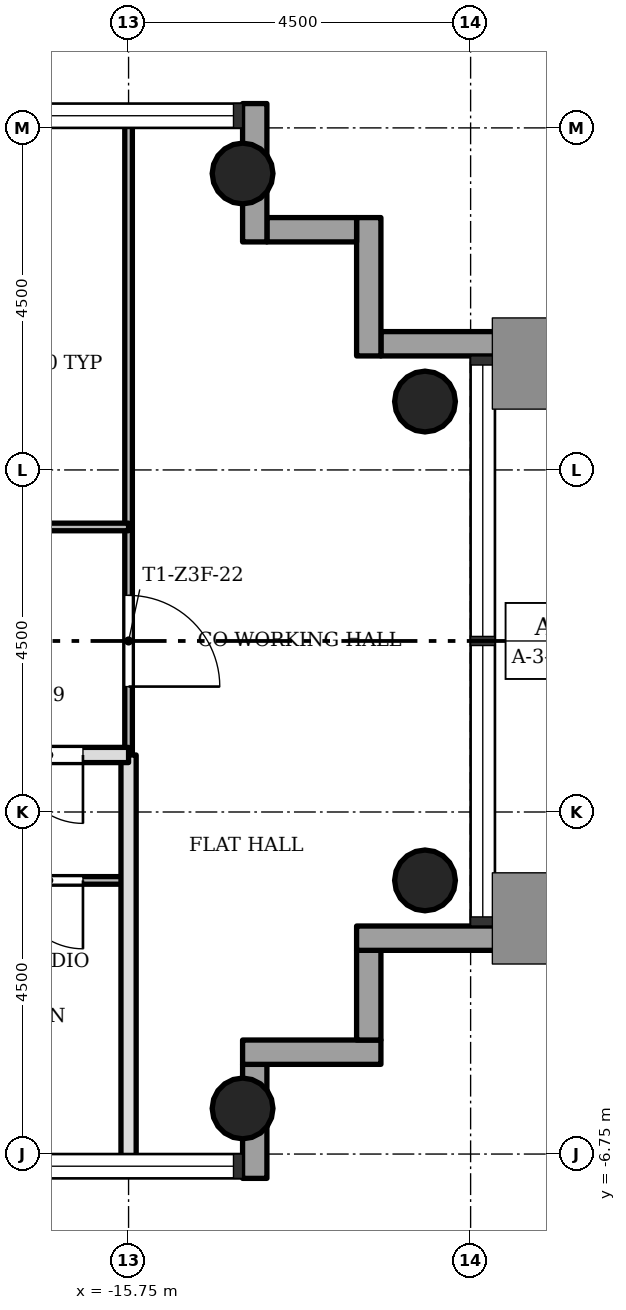
"""IFC4 building model, lengths in metres.
Left out: names, types, materials, properties, quantities, classifications, styles, units other than length and angle.
Written with IfcOpenShell. Run it as: python <this file> out.ifc"""

import sys

from ifc_helpers import new_model, si_unit, direction, frame, frame_2d, origin, origin_2d, place, context, subcontext, project, spatial, rectangle, hollow_circle, extrude, element, fill, save


model = new_model("IFC4")
c1 = context("Model", 3, precision=1e-05, world=origin(), true_north=direction((0.0, 1.0)))
c2 = subcontext(c1, "Body", "Model", "MODEL_VIEW")
j1 = project(units=[si_unit("LENGTHUNIT", "METRE"), si_unit("PLANEANGLEUNIT", "RADIAN")], contexts=[c1])
p1 = place(None, origin())
s1 = spatial("IfcSite", under=j1, at=p1, CompositionType="ELEMENT")
p2 = place(p1, origin())
s2 = spatial("IfcBuilding", under=s1, at=p2, CompositionType="ELEMENT")
p3 = place(p2, frame((0.0, 0.0, 171.1)))
s3 = spatial("IfcBuildingStorey", under=s2, at=p3, CompositionType="ELEMENT", Elevation=171.1)
for number, where, z_axis, x_axis in (
    (1, (-14.25, -6.15, 0.0), (0.0, 0.0, 1.0), (1.0, 0.0, 0.0)),
    (2, (-14.25, 6.15, 0.0), (0.0, 0.0, 1.0), (1.0, 0.0, 0.0)),
    (3, (-11.85, -3.15, 0.0), (0.0, 0.0, 1.0), (1.0, 0.0, 0.0)),
    (4, (-11.85, 3.15, 0.0), (0.0, 0.0, 1.0), (1.0, 0.0, 0.0)),
):
    element("IfcColumn", number, at=place(p3, frame(where, z_axis=z_axis, x_axis=x_axis)), inside=s3, PredefinedType="COLUMN", context=c2, shape_type="SweptSolid", body=[
        extrude(hollow_circle(Radius=0.4, WallThickness=0.028, at=origin_2d()), origin(), (0.0, 0.0, 1.0), 3.4),
    ])
p4 = place(p3, frame((-14.09, -7.07, -0.3), z_axis=(0.0, 0.0, 1.0), x_axis=(0.0, 1.0, 0.0)))
e5 = element("IfcWall", 5, at=p4, inside=s3, PredefinedType="STANDARD", context=c2, shape_type="SweptSolid", body=[
    extrude(rectangle(XDim=1.5, YDim=0.32, at=frame_2d((0.75, 0.0))), origin(), (0.0, 0.0, 1.0), 3.4),
])
p5 = place(p3, frame((-14.25, -5.41, -0.3), z_axis=(0.0, 0.0, 1.0), x_axis=(1.0, 0.0, 0.0)))
e6 = element("IfcWall", 6, at=p5, inside=s3, PredefinedType="STANDARD", context=c2, shape_type="SweptSolid", body=[
    extrude(rectangle(XDim=1.82, YDim=0.32, at=frame_2d((0.91, 0.0))), origin(), (0.0, 0.0, 1.0), 3.4),
])
p6 = place(p3, frame((-12.59, -5.25, -0.3), z_axis=(0.0, 0.0, 1.0), x_axis=(0.0, 1.0, 0.0)))
e7 = element("IfcWall", 7, at=p6, inside=s3, PredefinedType="STANDARD", context=c2, shape_type="SweptSolid", body=[
    extrude(rectangle(XDim=1.18, YDim=0.32, at=frame_2d((0.59, 0.0))), origin(), (0.0, 0.0, 1.0), 3.4),
])
p7 = place(p3, frame((-12.75, -3.91, -0.3), z_axis=(0.0, 0.0, 1.0), x_axis=(1.0, 0.0, 0.0)))
e8 = element("IfcWall", 8, at=p7, inside=s3, PredefinedType="STANDARD", context=c2, shape_type="SweptSolid", body=[
    extrude(rectangle(XDim=1.82, YDim=0.32, at=frame_2d((0.91, 0.0))), origin(), (0.0, 0.0, 1.0), 3.4),
])
p8 = place(p3, frame((-10.93, 3.91, -0.3), z_axis=(0.0, 0.0, 1.0), x_axis=(-1.0, 0.0, 0.0)))
e9 = element("IfcWall", 9, at=p8, inside=s3, PredefinedType="STANDARD", context=c2, shape_type="SweptSolid", body=[
    extrude(rectangle(XDim=1.5, YDim=0.32, at=frame_2d((0.75, 0.0))), origin(), (0.0, 0.0, 1.0), 3.4),
])
p9 = place(p3, frame((-12.59, 3.75, -0.3), z_axis=(0.0, 0.0, 1.0), x_axis=(0.0, 1.0, 0.0)))
e10 = element("IfcWall", 10, at=p9, inside=s3, PredefinedType="STANDARD", context=c2, shape_type="SweptSolid", body=[
    extrude(rectangle(XDim=1.82, YDim=0.32, at=frame_2d((0.91, 0.0))), origin(), (0.0, 0.0, 1.0), 3.4),
])
p10 = place(p3, frame((-12.75, 5.41, -0.3), z_axis=(0.0, 0.0, 1.0), x_axis=(-1.0, 0.0, 0.0)))
e11 = element("IfcWall", 11, at=p10, inside=s3, PredefinedType="STANDARD", context=c2, shape_type="SweptSolid", body=[
    extrude(rectangle(XDim=1.18, YDim=0.32, at=frame_2d((0.59, 0.0))), origin(), (0.0, 0.0, 1.0), 3.4),
])
p11 = place(p3, frame((-14.09, 5.25, -0.3), z_axis=(0.0, 0.0, 1.0), x_axis=(0.0, 1.0, 0.0)))
e12 = element("IfcWall", 12, at=p11, inside=s3, PredefinedType="STANDARD", context=c2, shape_type="SweptSolid", body=[
    extrude(rectangle(XDim=1.82, YDim=0.32, at=frame_2d((0.91, 0.0))), origin(), (0.0, 0.0, 1.0), 3.4),
])
p12 = place(p3, frame((-15.75, -1.5, 0.0), z_axis=(0.0, 0.0, 1.0), x_axis=(0.0, 1.0, 0.0)))
e13 = element("IfcWall", 13, at=p12, inside=s3, PredefinedType="PARTITIONING", context=c2, shape_type="SweptSolid", body=[
    extrude(rectangle(XDim=8.35, YDim=0.1, at=frame_2d((4.175, 0.0))), origin(), (0.0, 0.0, 1.0), 3.0),
])
p13 = place(p12, frame((0.9, 0.0, 0.0)))
e14 = element("IfcOpeningElement", 14, at=p13, cuts=e13, PredefinedType="OPENING", context=c2, shape_type="SweptSolid", body=[
    extrude(rectangle(XDim=1.2, YDim=2.1, at=frame_2d((0.6, 1.05))), frame((0.0, 0.06, 0.0), z_axis=(0.0, -1.0, 0.0), x_axis=(1.0, 0.0, 0.0)), (0.0, 0.0, 1.0), 0.12),
])
p14 = place(p3, frame((-15.75, -6.85, 0.0), z_axis=(0.0, 0.0, 1.0), x_axis=(0.0, 1.0, 0.0)))
e15 = element("IfcWall", 15, at=p14, inside=s3, PredefinedType="SOLIDWALL", context=c2, shape_type="SweptSolid", body=[
    extrude(rectangle(XDim=5.35, YDim=0.2, at=frame_2d((2.675, 0.0))), origin(), (0.0, 0.0, 1.0), 3.0),
])
p15 = place(p3, frame((-20.25, -3.15, 0.0), z_axis=(0.0, 0.0, 1.0), x_axis=(1.0, 0.0, 0.0)))
e16 = element("IfcWall", 16, at=p15, inside=s3, PredefinedType="PARTITIONING", context=c2, shape_type="SweptSolid", body=[
    extrude(rectangle(XDim=4.5, YDim=0.1, at=frame_2d((2.25, 0.0))), origin(), (0.0, 0.0, 1.0), 3.0),
])
p16 = place(p15, frame((3.0, 0.0, 0.0)))
e17 = element("IfcOpeningElement", 17, at=p16, cuts=e16, PredefinedType="OPENING", context=c2, shape_type="SweptSolid", body=[
    extrude(rectangle(XDim=0.9, YDim=2.1, at=frame_2d((0.45, 1.05))), frame((0.0, 0.06, 0.0), z_axis=(0.0, -1.0, 0.0), x_axis=(1.0, 0.0, 0.0)), (0.0, 0.0, 1.0), 0.12),
])
p17 = place(p3, frame((-20.25, -1.5, 0.0), z_axis=(0.0, 0.0, 1.0), x_axis=(1.0, 0.0, 0.0)))
e18 = element("IfcWall", 18, at=p17, inside=s3, PredefinedType="SOLIDWALL", context=c2, shape_type="SweptSolid", body=[
    extrude(rectangle(XDim=4.5, YDim=0.2, at=frame_2d((2.25, 0.0))), origin(), (0.0, 0.0, 1.0), 3.0),
])
p18 = place(p17, frame((3.0, 0.0, 0.0)))
e19 = element("IfcOpeningElement", 19, at=p18, cuts=e18, PredefinedType="OPENING", context=c2, shape_type="SweptSolid", body=[
    extrude(rectangle(XDim=0.9, YDim=2.1, at=frame_2d((0.45, 1.05))), frame((0.0, 0.11, 0.0), z_axis=(0.0, -1.0, 0.0), x_axis=(1.0, 0.0, 0.0)), (0.0, 0.0, 1.0), 0.22),
])
p19 = place(p3, frame((-20.25, 1.5, 0.0), z_axis=(0.0, 0.0, 1.0), x_axis=(1.0, 0.0, 0.0)))
e20 = element("IfcWall", 20, at=p19, inside=s3, PredefinedType="PARTITIONING", context=c2, shape_type="SweptSolid", body=[
    extrude(rectangle(XDim=4.5, YDim=0.1, at=frame_2d((2.25, 0.0))), origin(), (0.0, 0.0, 1.0), 3.0),
])
p20 = place(p19, frame((1.8, 0.0, 0.0)))
e21 = element("IfcOpeningElement", 21, at=p20, cuts=e20, PredefinedType="OPENING", context=c2, shape_type="SweptSolid", body=[
    extrude(rectangle(XDim=0.9, YDim=2.1, at=frame_2d((0.45, 1.05))), frame((0.0, 0.06, 0.0), z_axis=(0.0, -1.0, 0.0), x_axis=(1.0, 0.0, 0.0)), (0.0, 0.0, 1.0), 0.12),
])
p21 = place(p18, origin())
e22 = element("IfcDoor", 22, at=p21, inside=s3, OperationType="SINGLE_SWING_RIGHT", PredefinedType="DOOR", context=c2, shape_type="SweptSolid", body=[
    extrude(rectangle(XDim=0.9, YDim=2.1, at=frame_2d((0.45, 1.05))), frame((0.0, 0.025, 0.0), z_axis=(0.0, -1.0, 0.0), x_axis=(1.0, 0.0, 0.0)), (0.0, 0.0, 1.0), 0.05),
])
fill(e19, e22)
p22 = place(p16, origin())
e23 = element("IfcDoor", 23, at=p22, inside=s3, OperationType="SINGLE_SWING_RIGHT", PredefinedType="DOOR", context=c2, shape_type="SweptSolid", body=[
    extrude(rectangle(XDim=0.9, YDim=2.1, at=frame_2d((0.45, 1.05))), frame((0.0, 0.025, 0.0), z_axis=(0.0, -1.0, 0.0), x_axis=(1.0, 0.0, 0.0)), (0.0, 0.0, 1.0), 0.05),
])
fill(e17, e23)
p23 = place(p13, origin())
e24 = element("IfcDoor", 24, at=p23, inside=s3, OperationType="SINGLE_SWING_LEFT", PredefinedType="DOOR", context=c2, shape_type="SweptSolid", body=[
    extrude(rectangle(XDim=1.2, YDim=2.1, at=frame_2d((0.6, 1.05))), frame((0.0, 0.025, 0.0), z_axis=(0.0, -1.0, 0.0), x_axis=(1.0, 0.0, 0.0)), (0.0, 0.0, 1.0), 0.05),
])
fill(e14, e24)
save(model, sys.argv[1])
